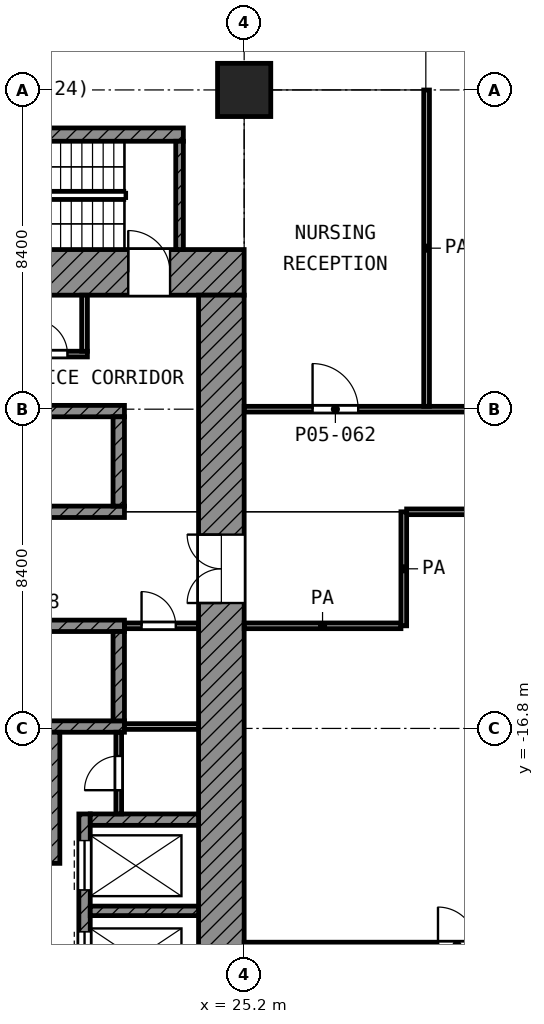
"""IFC4 building model, lengths in metres.
Left out: names, types, materials, properties, quantities, classifications, styles, units other than length and angle.
Written with IfcOpenShell. Run it as: python <this file> out.ifc"""

import sys

from ifc_helpers import new_model, si_unit, direction, frame, frame_2d, origin, origin_2d, place, context, subcontext, project, spatial, rectangle, extrude, element, fill, save


model = new_model("IFC4")
c1 = context("Model", 3, precision=1e-05, world=origin(), true_north=direction((0.0, 1.0)))
c2 = subcontext(c1, "Body", "Model", "MODEL_VIEW")
j1 = project(units=[si_unit("LENGTHUNIT", "METRE"), si_unit("PLANEANGLEUNIT", "RADIAN")], contexts=[c1])
p1 = place(None, origin())
s1 = spatial("IfcSite", under=j1, at=p1, CompositionType="ELEMENT")
p2 = place(p1, origin())
s2 = spatial("IfcBuilding", under=s1, at=p2, CompositionType="ELEMENT")
p3 = place(p2, frame((0.0, 0.0, 23.8)))
s3 = spatial("IfcBuildingStorey", under=s2, at=p3, CompositionType="ELEMENT", Elevation=23.8)
p4 = place(p3, frame((25.2, 0.0, 0.0), z_axis=(0.0, 0.0, 1.0), x_axis=(1.0, 0.0, 0.0)))
e1 = element("IfcColumn", 1, at=p4, inside=s3, PredefinedType="COLUMN", context=c2, shape_type="SweptSolid", body=[
    extrude(rectangle(XDim=1.4, YDim=1.4, at=origin_2d()), origin(), (0.0, 0.0, 1.0), 5.2),
])
p5 = place(p3, frame((4.2, -4.8, 0.0), z_axis=(0.0, 0.0, 1.0), x_axis=(1.0, 0.0, 0.0)))
e2 = element("IfcWall", 2, at=p5, inside=s3, PredefinedType="SHEAR", context=c2, shape_type="SweptSolid", body=[
    extrude(rectangle(XDim=21.0, YDim=1.2, at=frame_2d((10.5, 0.0))), origin(), (0.0, 0.0, 1.0), 4.85),
])
p6 = place(p5, frame((1.95, 0.0, 0.0)))
e3 = element("IfcOpeningElement", 3, at=p6, cuts=e2, PredefinedType="OPENING", context=c2, shape_type="SweptSolid", body=[
    extrude(rectangle(XDim=1.1, YDim=2.1, at=frame_2d((0.55, 1.05))), frame((0.0, 0.61, 0.0), z_axis=(0.0, -1.0, 0.0), x_axis=(1.0, 0.0, 0.0)), (0.0, 0.0, 1.0), 1.22),
])
p7 = place(p5, frame((17.95, 0.0, 0.0)))
e4 = element("IfcOpeningElement", 4, at=p7, cuts=e2, PredefinedType="OPENING", context=c2, shape_type="SweptSolid", body=[
    extrude(rectangle(XDim=1.1, YDim=2.1, at=frame_2d((0.55, 1.05))), frame((0.0, 0.61, 0.0), z_axis=(0.0, -1.0, 0.0), x_axis=(1.0, 0.0, 0.0)), (0.0, 0.0, 1.0), 1.22),
])
p8 = place(p3, frame((24.6, -24.0, 0.0), z_axis=(0.0, 0.0, 1.0), x_axis=(0.0, 1.0, 0.0)))
e5 = element("IfcWall", 5, at=p8, inside=s3, PredefinedType="SHEAR", context=c2, shape_type="SweptSolid", body=[
    extrude(rectangle(XDim=18.6, YDim=1.2, at=frame_2d((9.3, 0.0))), origin(), (0.0, 0.0, 1.0), 4.85),
])
p9 = place(p8, frame((10.5, 0.0, 0.0)))
e6 = element("IfcOpeningElement", 6, at=p9, cuts=e5, PredefinedType="OPENING", context=c2, shape_type="SweptSolid", body=[
    extrude(rectangle(XDim=1.8, YDim=2.1, at=frame_2d((0.9, 1.05))), frame((0.0, 0.61, 0.0), z_axis=(0.0, -1.0, 0.0), x_axis=(1.0, 0.0, 0.0)), (0.0, 0.0, 1.0), 1.22),
])
p10 = place(p3, frame((5.4, -8.45, 0.0), z_axis=(0.0, 0.0, 1.0), x_axis=(1.0, 0.0, 0.0)))
e7 = element("IfcWall", 7, at=p10, inside=s3, PredefinedType="SHEAR", context=c2, shape_type="SweptSolid", body=[
    extrude(rectangle(XDim=16.65, YDim=0.3, at=frame_2d((8.325, 0.0))), origin(), (0.0, 0.0, 1.0), 4.85),
])
p11 = place(p3, frame((5.4, -11.1, 0.0), z_axis=(0.0, 0.0, 1.0), x_axis=(1.0, 0.0, 0.0)))
e8 = element("IfcWall", 8, at=p11, inside=s3, PredefinedType="SHEAR", context=c2, shape_type="SweptSolid", body=[
    extrude(rectangle(XDim=16.65, YDim=0.3, at=frame_2d((8.325, 0.0))), origin(), (0.0, 0.0, 1.0), 4.85),
])
p12 = place(p11, frame((0.825, 0.0, 0.0)))
e9 = element("IfcOpeningElement", 9, at=p12, cuts=e8, PredefinedType="OPENING", context=c2, shape_type="SweptSolid", body=[
    extrude(rectangle(XDim=1.1, YDim=2.1, at=frame_2d((0.55, 1.05))), frame((0.0, 0.16, 0.0), z_axis=(0.0, -1.0, 0.0), x_axis=(1.0, 0.0, 0.0)), (0.0, 0.0, 1.0), 0.32),
])
p13 = place(p11, frame((3.575, 0.0, 0.0)))
e10 = element("IfcOpeningElement", 10, at=p13, cuts=e8, PredefinedType="OPENING", context=c2, shape_type="SweptSolid", body=[
    extrude(rectangle(XDim=1.1, YDim=2.1, at=frame_2d((0.55, 1.05))), frame((0.0, 0.16, 0.0), z_axis=(0.0, -1.0, 0.0), x_axis=(1.0, 0.0, 0.0)), (0.0, 0.0, 1.0), 0.32),
])
p14 = place(p11, frame((6.325, 0.0, 0.0)))
e11 = element("IfcOpeningElement", 11, at=p14, cuts=e8, PredefinedType="OPENING", context=c2, shape_type="SweptSolid", body=[
    extrude(rectangle(XDim=1.1, YDim=2.1, at=frame_2d((0.55, 1.05))), frame((0.0, 0.16, 0.0), z_axis=(0.0, -1.0, 0.0), x_axis=(1.0, 0.0, 0.0)), (0.0, 0.0, 1.0), 0.32),
])
p15 = place(p11, frame((9.075, 0.0, 0.0)))
e12 = element("IfcOpeningElement", 12, at=p15, cuts=e8, PredefinedType="OPENING", context=c2, shape_type="SweptSolid", body=[
    extrude(rectangle(XDim=1.1, YDim=2.1, at=frame_2d((0.55, 1.05))), frame((0.0, 0.16, 0.0), z_axis=(0.0, -1.0, 0.0), x_axis=(1.0, 0.0, 0.0)), (0.0, 0.0, 1.0), 0.32),
])
for number, where, z_axis, x_axis in (
    (13, (5.4, -14.1, 0.0), (0.0, 0.0, 1.0), (1.0, 0.0, 0.0)),
    (14, (5.4, -16.75, 0.0), (0.0, 0.0, 1.0), (1.0, 0.0, 0.0)),
):
    element("IfcWall", number, at=place(p3, frame(where, z_axis=z_axis, x_axis=x_axis)), inside=s3, PredefinedType="SHEAR", context=c2, shape_type="SweptSolid", body=[
        extrude(rectangle(XDim=16.65, YDim=0.3, at=frame_2d((8.325, 0.0))), origin(), (0.0, 0.0, 1.0), 4.85),
    ])
p16 = place(p3, frame((20.2, -20.35, 0.0), z_axis=(0.0, 0.0, 1.0), x_axis=(0.0, 1.0, 0.0)))
e15 = element("IfcWall", 15, at=p16, inside=s3, PredefinedType="SHEAR", context=c2, shape_type="SweptSolid", body=[
    extrude(rectangle(XDim=3.45, YDim=0.3, at=frame_2d((1.725, 0.0))), origin(), (0.0, 0.0, 1.0), 4.85),
])
p17 = place(p3, frame((21.9, -10.95, 0.0), z_axis=(0.0, 0.0, 1.0), x_axis=(0.0, 1.0, 0.0)))
e16 = element("IfcWall", 16, at=p17, inside=s3, PredefinedType="SHEAR", context=c2, shape_type="SweptSolid", body=[
    extrude(rectangle(XDim=2.35, YDim=0.3, at=frame_2d((1.175, 0.0))), origin(), (0.0, 0.0, 1.0), 4.85),
])
p18 = place(p3, frame((21.9, -16.6, 0.0), z_axis=(0.0, 0.0, 1.0), x_axis=(0.0, 1.0, 0.0)))
e17 = element("IfcWall", 17, at=p18, inside=s3, PredefinedType="SHEAR", context=c2, shape_type="SweptSolid", body=[
    extrude(rectangle(XDim=2.35, YDim=0.3, at=frame_2d((1.175, 0.0))), origin(), (0.0, 0.0, 1.0), 4.85),
])
p19 = place(p3, frame((21.15, -19.2, 0.0), z_axis=(0.0, 0.0, 1.0), x_axis=(1.0, 0.0, 0.0)))
e18 = element("IfcWall", 18, at=p19, inside=s3, PredefinedType="SHEAR", context=c2, shape_type="SweptSolid", body=[
    extrude(rectangle(XDim=2.85, YDim=0.3, at=frame_2d((1.425, 0.0))), origin(), (0.0, 0.0, 1.0), 4.85),
])
p20 = place(p3, frame((21.0, -24.0, 0.0), z_axis=(0.0, 0.0, 1.0), x_axis=(0.0, 1.0, 0.0)))
e19 = element("IfcWall", 19, at=p20, inside=s3, PredefinedType="SHEAR", context=c2, shape_type="SweptSolid", body=[
    extrude(rectangle(XDim=4.95, YDim=0.3, at=frame_2d((2.475, 0.0))), origin(), (0.0, 0.0, 1.0), 4.85),
])
p21 = place(p20, frame((2.95, 0.0, 0.0)))
e20 = element("IfcOpeningElement", 20, at=p21, cuts=e19, PredefinedType="OPENING", context=c2, shape_type="SweptSolid", body=[
    extrude(rectangle(XDim=1.3, YDim=2.1, at=frame_2d((0.65, 1.05))), frame((0.0, 0.16, 0.0), z_axis=(0.0, -1.0, 0.0), x_axis=(1.0, 0.0, 0.0)), (0.0, 0.0, 1.0), 0.32),
])
p22 = place(p20, frame((0.55, 0.0, 0.0)))
e21 = element("IfcOpeningElement", 21, at=p22, cuts=e19, PredefinedType="OPENING", context=c2, shape_type="SweptSolid", body=[
    extrude(rectangle(XDim=1.3, YDim=2.1, at=frame_2d((0.65, 1.05))), frame((0.0, 0.16, 0.0), z_axis=(0.0, -1.0, 0.0), x_axis=(1.0, 0.0, 0.0)), (0.0, 0.0, 1.0), 0.32),
])
p23 = place(p3, frame((21.15, -21.6, 0.0), z_axis=(0.0, 0.0, 1.0), x_axis=(1.0, 0.0, 0.0)))
e22 = element("IfcWall", 22, at=p23, inside=s3, PredefinedType="SHEAR", context=c2, shape_type="SweptSolid", body=[
    extrude(rectangle(XDim=2.85, YDim=0.25, at=frame_2d((1.425, 0.0))), origin(), (0.0, 0.0, 1.0), 4.85),
])
p24 = place(p3, frame((21.9, -19.05, 0.0), z_axis=(0.0, 0.0, 1.0), x_axis=(0.0, 1.0, 0.0)))
e23 = element("IfcWall", 23, at=p24, inside=s3, PredefinedType="PARTITIONING", context=c2, shape_type="SweptSolid", body=[
    extrude(rectangle(XDim=2.15, YDim=0.15, at=frame_2d((1.075, 0.0))), origin(), (0.0, 0.0, 1.0), 4.85),
])
p25 = place(p24, frame((0.625, 0.0, 0.0)))
e24 = element("IfcOpeningElement", 24, at=p25, cuts=e23, PredefinedType="OPENING", context=c2, shape_type="SweptSolid", body=[
    extrude(rectangle(XDim=0.9, YDim=2.1, at=frame_2d((0.45, 1.05))), frame((0.0, 0.085, 0.0), z_axis=(0.0, -1.0, 0.0), x_axis=(1.0, 0.0, 0.0)), (0.0, 0.0, 1.0), 0.17),
])
p26 = place(p3, frame((22.05, -16.75, 0.0), z_axis=(0.0, 0.0, 1.0), x_axis=(1.0, 0.0, 0.0)))
e25 = element("IfcWall", 25, at=p26, inside=s3, PredefinedType="PARTITIONING", context=c2, shape_type="SweptSolid", body=[
    extrude(rectangle(XDim=1.95, YDim=0.15, at=frame_2d((0.975, 0.0))), origin(), (0.0, 0.0, 1.0), 4.85),
])
p27 = place(p3, frame((22.05, -14.1, 0.0), z_axis=(0.0, 0.0, 1.0), x_axis=(1.0, 0.0, 0.0)))
e26 = element("IfcWall", 26, at=p27, inside=s3, PredefinedType="PARTITIONING", context=c2, shape_type="SweptSolid", body=[
    extrude(rectangle(XDim=1.95, YDim=0.15, at=frame_2d((0.975, 0.0))), origin(), (0.0, 0.0, 1.0), 4.85),
])
p28 = place(p27, frame((0.45, 0.0, 0.0)))
e27 = element("IfcOpeningElement", 27, at=p28, cuts=e26, PredefinedType="OPENING", context=c2, shape_type="SweptSolid", body=[
    extrude(rectangle(XDim=0.9, YDim=2.1, at=frame_2d((0.45, 1.05))), frame((0.0, 0.085, 0.0), z_axis=(0.0, -1.0, 0.0), x_axis=(1.0, 0.0, 0.0)), (0.0, 0.0, 1.0), 0.17),
])
p29 = place(p3, frame((8.325, -6.95, 0.0), z_axis=(0.0, 0.0, 1.0), x_axis=(1.0, 0.0, 0.0)))
e28 = element("IfcWall", 28, at=p29, inside=s3, PredefinedType="PARTITIONING", context=c2, shape_type="SweptSolid", body=[
    extrude(rectangle(XDim=12.75, YDim=0.15, at=frame_2d((6.375, 0.0))), origin(), (0.0, 0.0, 1.0), 4.85),
])
p30 = place(p29, frame((1.125, 0.0, 0.0)))
e29 = element("IfcOpeningElement", 29, at=p30, cuts=e28, PredefinedType="OPENING", context=c2, shape_type="SweptSolid", body=[
    extrude(rectangle(XDim=0.9, YDim=2.1, at=frame_2d((0.45, 1.05))), frame((0.0, 0.085, 0.0), z_axis=(0.0, -1.0, 0.0), x_axis=(1.0, 0.0, 0.0)), (0.0, 0.0, 1.0), 0.17),
])
p31 = place(p29, frame((3.225, 0.0, 0.0)))
e30 = element("IfcOpeningElement", 30, at=p31, cuts=e28, PredefinedType="OPENING", context=c2, shape_type="SweptSolid", body=[
    extrude(rectangle(XDim=0.9, YDim=2.1, at=frame_2d((0.45, 1.05))), frame((0.0, 0.085, 0.0), z_axis=(0.0, -1.0, 0.0), x_axis=(1.0, 0.0, 0.0)), (0.0, 0.0, 1.0), 0.17),
])
p32 = place(p29, frame((5.025, 0.0, 0.0)))
e31 = element("IfcOpeningElement", 31, at=p32, cuts=e28, PredefinedType="OPENING", context=c2, shape_type="SweptSolid", body=[
    extrude(rectangle(XDim=0.9, YDim=2.1, at=frame_2d((0.45, 1.05))), frame((0.0, 0.085, 0.0), z_axis=(0.0, -1.0, 0.0), x_axis=(1.0, 0.0, 0.0)), (0.0, 0.0, 1.0), 0.17),
])
p33 = place(p29, frame((7.425, 0.0, 0.0)))
e32 = element("IfcOpeningElement", 32, at=p33, cuts=e28, PredefinedType="OPENING", context=c2, shape_type="SweptSolid", body=[
    extrude(rectangle(XDim=0.9, YDim=2.1, at=frame_2d((0.45, 1.05))), frame((0.0, 0.085, 0.0), z_axis=(0.0, -1.0, 0.0), x_axis=(1.0, 0.0, 0.0)), (0.0, 0.0, 1.0), 0.17),
])
p34 = place(p29, frame((9.525, 0.0, 0.0)))
e33 = element("IfcOpeningElement", 33, at=p34, cuts=e28, PredefinedType="OPENING", context=c2, shape_type="SweptSolid", body=[
    extrude(rectangle(XDim=0.9, YDim=2.1, at=frame_2d((0.45, 1.05))), frame((0.0, 0.085, 0.0), z_axis=(0.0, -1.0, 0.0), x_axis=(1.0, 0.0, 0.0)), (0.0, 0.0, 1.0), 0.17),
])
p35 = place(p29, frame((11.325, 0.0, 0.0)))
e34 = element("IfcOpeningElement", 34, at=p35, cuts=e28, PredefinedType="OPENING", context=c2, shape_type="SweptSolid", body=[
    extrude(rectangle(XDim=0.9, YDim=2.1, at=frame_2d((0.45, 1.05))), frame((0.0, 0.085, 0.0), z_axis=(0.0, -1.0, 0.0), x_axis=(1.0, 0.0, 0.0)), (0.0, 0.0, 1.0), 0.17),
])
p36 = place(p3, frame((21.0, -6.875, 0.0), z_axis=(0.0, 0.0, 1.0), x_axis=(0.0, 1.0, 0.0)))
e35 = element("IfcWall", 35, at=p36, inside=s3, PredefinedType="PARTITIONING", context=c2, shape_type="SweptSolid", body=[
    extrude(rectangle(XDim=1.475, YDim=0.15, at=frame_2d((0.738, 0.0))), origin(), (0.0, 0.0, 1.0), 4.85),
])
p37 = place(p3, frame((15.15, -1.175, 0.0), z_axis=(0.0, 0.0, 1.0), x_axis=(1.0, 0.0, 0.0)))
e36 = element("IfcWall", 36, at=p37, inside=s3, PredefinedType="SHEAR", context=c2, shape_type="SweptSolid", body=[
    extrude(rectangle(XDim=8.45, YDim=0.35, at=frame_2d((4.225, 0.0))), origin(), (0.0, 0.0, 1.0), 4.85),
])
p38 = place(p3, frame((23.5, -4.2, 0.0), z_axis=(0.0, 0.0, 1.0), x_axis=(0.0, 1.0, 0.0)))
e37 = element("IfcWall", 37, at=p38, inside=s3, PredefinedType="SHEAR", context=c2, shape_type="SweptSolid", body=[
    extrude(rectangle(XDim=2.85, YDim=0.2, at=frame_2d((1.425, 0.0))), origin(), (0.0, 0.0, 1.0), 4.85),
])
p39 = place(p3, frame((25.2, -22.5, 0.0), z_axis=(0.0, 0.0, 1.0), x_axis=(1.0, 0.0, 0.0)))
e38 = element("IfcWall", 38, at=p39, inside=s3, PredefinedType="PARTITIONING", context=c2, shape_type="SweptSolid", body=[
    extrude(rectangle(XDim=58.7, YDim=0.15, at=frame_2d((29.35, 0.0))), origin(), (0.0, 0.0, 1.0), 4.85),
])
p40 = place(p39, frame((5.1, 0.0, 0.0)))
e39 = element("IfcOpeningElement", 39, at=p40, cuts=e38, PredefinedType="OPENING", context=c2, shape_type="SweptSolid", body=[
    extrude(rectangle(XDim=1.0, YDim=2.1, at=frame_2d((0.5, 1.05))), frame((0.0, 0.085, 0.0), z_axis=(0.0, -1.0, 0.0), x_axis=(1.0, 0.0, 0.0)), (0.0, 0.0, 1.0), 0.17),
])
p41 = place(p39, frame((10.7, 0.0, 0.0)))
e40 = element("IfcOpeningElement", 40, at=p41, cuts=e38, PredefinedType="OPENING", context=c2, shape_type="SweptSolid", body=[
    extrude(rectangle(XDim=1.0, YDim=2.1, at=frame_2d((0.5, 1.05))), frame((0.0, 0.085, 0.0), z_axis=(0.0, -1.0, 0.0), x_axis=(1.0, 0.0, 0.0)), (0.0, 0.0, 1.0), 0.17),
])
p42 = place(p39, frame((35.9, 0.0, 0.0)))
e41 = element("IfcOpeningElement", 41, at=p42, cuts=e38, PredefinedType="OPENING", context=c2, shape_type="SweptSolid", body=[
    extrude(rectangle(XDim=1.0, YDim=2.1, at=frame_2d((0.5, 1.05))), frame((0.0, 0.085, 0.0), z_axis=(0.0, -1.0, 0.0), x_axis=(1.0, 0.0, 0.0)), (0.0, 0.0, 1.0), 0.17),
])
p43 = place(p39, frame((38.7, 0.0, 0.0)))
e42 = element("IfcOpeningElement", 42, at=p43, cuts=e38, PredefinedType="OPENING", context=c2, shape_type="SweptSolid", body=[
    extrude(rectangle(XDim=1.0, YDim=2.1, at=frame_2d((0.5, 1.05))), frame((0.0, 0.085, 0.0), z_axis=(0.0, -1.0, 0.0), x_axis=(1.0, 0.0, 0.0)), (0.0, 0.0, 1.0), 0.17),
])
p44 = place(p3, frame((25.2, -14.1, 0.0), z_axis=(0.0, 0.0, 1.0), x_axis=(1.0, 0.0, 0.0)))
e43 = element("IfcWall", 43, at=p44, inside=s3, PredefinedType="PARTITIONING", context=c2, shape_type="SweptSolid", body=[
    extrude(rectangle(XDim=4.125, YDim=0.15, at=frame_2d((2.062, 0.0))), origin(), (0.0, 0.0, 1.0), 4.85),
])
p45 = place(p3, frame((29.475, -11.1, 0.0), z_axis=(0.0, 0.0, 1.0), x_axis=(1.0, 0.0, 0.0)))
e44 = element("IfcWall", 44, at=p45, inside=s3, PredefinedType="PARTITIONING", context=c2, shape_type="SweptSolid", body=[
    extrude(rectangle(XDim=54.425, YDim=0.15, at=frame_2d((27.212, 0.0))), origin(), (0.0, 0.0, 1.0), 4.85),
])
p46 = place(p45, frame((23.225, 0.0, 0.0)))
e45 = element("IfcOpeningElement", 45, at=p46, cuts=e44, PredefinedType="OPENING", context=c2, shape_type="SweptSolid", body=[
    extrude(rectangle(XDim=1.0, YDim=2.1, at=frame_2d((0.5, 1.05))), frame((0.0, 0.085, 0.0), z_axis=(0.0, -1.0, 0.0), x_axis=(1.0, 0.0, 0.0)), (0.0, 0.0, 1.0), 0.17),
])
p47 = place(p45, frame((17.625, 0.0, 0.0)))
e46 = element("IfcOpeningElement", 46, at=p47, cuts=e44, PredefinedType="OPENING", context=c2, shape_type="SweptSolid", body=[
    extrude(rectangle(XDim=1.0, YDim=2.1, at=frame_2d((0.5, 1.05))), frame((0.0, 0.085, 0.0), z_axis=(0.0, -1.0, 0.0), x_axis=(1.0, 0.0, 0.0)), (0.0, 0.0, 1.0), 0.17),
])
p48 = place(p45, frame((42.825, 0.0, 0.0)))
e47 = element("IfcOpeningElement", 47, at=p48, cuts=e44, PredefinedType="OPENING", context=c2, shape_type="SweptSolid", body=[
    extrude(rectangle(XDim=1.0, YDim=2.1, at=frame_2d((0.5, 1.05))), frame((0.0, 0.085, 0.0), z_axis=(0.0, -1.0, 0.0), x_axis=(1.0, 0.0, 0.0)), (0.0, 0.0, 1.0), 0.17),
])
p49 = place(p45, frame((40.025, 0.0, 0.0)))
e48 = element("IfcOpeningElement", 48, at=p49, cuts=e44, PredefinedType="OPENING", context=c2, shape_type="SweptSolid", body=[
    extrude(rectangle(XDim=1.0, YDim=2.1, at=frame_2d((0.5, 1.05))), frame((0.0, 0.085, 0.0), z_axis=(0.0, -1.0, 0.0), x_axis=(1.0, 0.0, 0.0)), (0.0, 0.0, 1.0), 0.17),
])
p50 = place(p45, frame((51.225, 0.0, 0.0)))
e49 = element("IfcOpeningElement", 49, at=p50, cuts=e44, PredefinedType="OPENING", context=c2, shape_type="SweptSolid", body=[
    extrude(rectangle(XDim=1.0, YDim=2.1, at=frame_2d((0.5, 1.05))), frame((0.0, 0.085, 0.0), z_axis=(0.0, -1.0, 0.0), x_axis=(1.0, 0.0, 0.0)), (0.0, 0.0, 1.0), 0.17),
])
p51 = place(p45, frame((48.425, 0.0, 0.0)))
e50 = element("IfcOpeningElement", 50, at=p51, cuts=e44, PredefinedType="OPENING", context=c2, shape_type="SweptSolid", body=[
    extrude(rectangle(XDim=1.0, YDim=2.1, at=frame_2d((0.5, 1.05))), frame((0.0, 0.085, 0.0), z_axis=(0.0, -1.0, 0.0), x_axis=(1.0, 0.0, 0.0)), (0.0, 0.0, 1.0), 0.17),
])
p52 = place(p3, frame((25.2, -8.4, 0.0), z_axis=(0.0, 0.0, 1.0), x_axis=(1.0, 0.0, 0.0)))
e51 = element("IfcWall", 51, at=p52, inside=s3, PredefinedType="PARTITIONING", context=c2, shape_type="SweptSolid", body=[
    extrude(rectangle(XDim=14.732, YDim=0.15, at=frame_2d((7.366, 0.0))), origin(), (0.0, 0.0, 1.0), 4.85),
])
p53 = place(p52, frame((1.8, 0.0, 0.0)))
e52 = element("IfcOpeningElement", 52, at=p53, cuts=e51, PredefinedType="OPENING", context=c2, shape_type="SweptSolid", body=[
    extrude(rectangle(XDim=1.2, YDim=2.1, at=frame_2d((0.6, 1.05))), frame((0.0, 0.085, 0.0), z_axis=(0.0, -1.0, 0.0), x_axis=(1.0, 0.0, 0.0)), (0.0, 0.0, 1.0), 0.17),
])
p54 = place(p52, frame((6.536, 0.0, 0.0)))
e53 = element("IfcOpeningElement", 53, at=p54, cuts=e51, PredefinedType="OPENING", context=c2, shape_type="SweptSolid", body=[
    extrude(rectangle(XDim=1.0, YDim=2.1, at=frame_2d((0.5, 1.05))), frame((0.0, 0.085, 0.0), z_axis=(0.0, -1.0, 0.0), x_axis=(1.0, 0.0, 0.0)), (0.0, 0.0, 1.0), 0.17),
])
p55 = place(p52, frame((10.971, 0.0, 0.0)))
e54 = element("IfcOpeningElement", 54, at=p55, cuts=e51, PredefinedType="OPENING", context=c2, shape_type="SweptSolid", body=[
    extrude(rectangle(XDim=1.0, YDim=2.1, at=frame_2d((0.5, 1.05))), frame((0.0, 0.085, 0.0), z_axis=(0.0, -1.0, 0.0), x_axis=(1.0, 0.0, 0.0)), (0.0, 0.0, 1.0), 0.17),
])
p56 = place(p3, frame((29.4, -14.1, 0.0), z_axis=(0.0, 0.0, 1.0), x_axis=(0.0, 1.0, 0.0)))
e55 = element("IfcWall", 55, at=p56, inside=s3, PredefinedType="PARTITIONING", context=c2, shape_type="SweptSolid", body=[
    extrude(rectangle(XDim=3.0, YDim=0.15, at=frame_2d((1.5, 0.0))), origin(), (0.0, 0.0, 1.0), 4.85),
])
p57 = place(p3, frame((30.0, -8.325, 0.0), z_axis=(0.0, 0.0, 1.0), x_axis=(0.0, 1.0, 0.0)))
e56 = element("IfcWall", 56, at=p57, inside=s3, PredefinedType="PARTITIONING", context=c2, shape_type="SweptSolid", body=[
    extrude(rectangle(XDim=8.323, YDim=0.15, at=frame_2d((4.162, 0.0))), origin(), (0.0, 0.0, 1.0), 3.45),
])
p58 = place(p21, origin())
e57 = element("IfcDoor", 57, at=p58, inside=s3, OperationType="DOUBLE_DOOR_SLIDING", PredefinedType="DOOR", context=c2, shape_type="SweptSolid", body=[
    extrude(rectangle(XDim=1.3, YDim=2.1, at=frame_2d((0.65, 1.05))), frame((0.0, 0.025, 0.0), z_axis=(0.0, -1.0, 0.0), x_axis=(1.0, 0.0, 0.0)), (0.0, 0.0, 1.0), 0.05),
])
fill(e20, e57)
p59 = place(p22, origin())
e58 = element("IfcDoor", 58, at=p59, inside=s3, OperationType="DOUBLE_DOOR_SLIDING", PredefinedType="DOOR", context=c2, shape_type="SweptSolid", body=[
    extrude(rectangle(XDim=1.3, YDim=2.1, at=frame_2d((0.65, 1.05))), frame((0.0, 0.025, 0.0), z_axis=(0.0, -1.0, 0.0), x_axis=(1.0, 0.0, 0.0)), (0.0, 0.0, 1.0), 0.05),
])
fill(e21, e58)
p60 = place(p7, origin())
e59 = element("IfcDoor", 59, at=p60, inside=s3, OperationType="SINGLE_SWING_LEFT", PredefinedType="DOOR", context=c2, shape_type="SweptSolid", body=[
    extrude(rectangle(XDim=1.1, YDim=2.1, at=frame_2d((0.55, 1.05))), frame((0.0, 0.025, 0.0), z_axis=(0.0, -1.0, 0.0), x_axis=(1.0, 0.0, 0.0)), (0.0, 0.0, 1.0), 0.05),
])
fill(e4, e59)
p61 = place(p9, origin())
e60 = element("IfcDoor", 60, at=p61, inside=s3, OperationType="DOUBLE_DOOR_SINGLE_SWING", PredefinedType="DOOR", context=c2, shape_type="SweptSolid", body=[
    extrude(rectangle(XDim=1.8, YDim=2.1, at=frame_2d((0.9, 1.05))), frame((0.0, 0.025, 0.0), z_axis=(0.0, -1.0, 0.0), x_axis=(1.0, 0.0, 0.0)), (0.0, 0.0, 1.0), 0.05),
])
fill(e6, e60)
p62 = place(p35, origin())
e61 = element("IfcDoor", 61, at=p62, inside=s3, OperationType="SINGLE_SWING_LEFT", PredefinedType="DOOR", context=c2, shape_type="SweptSolid", body=[
    extrude(rectangle(XDim=0.9, YDim=2.1, at=frame_2d((0.45, 1.05))), frame((0.0, 0.025, 0.0), z_axis=(0.0, -1.0, 0.0), x_axis=(1.0, 0.0, 0.0)), (0.0, 0.0, 1.0), 0.05),
])
fill(e34, e61)
p63 = place(p28, origin())
e62 = element("IfcDoor", 62, at=p63, inside=s3, OperationType="SINGLE_SWING_LEFT", PredefinedType="DOOR", context=c2, shape_type="SweptSolid", body=[
    extrude(rectangle(XDim=0.9, YDim=2.1, at=frame_2d((0.45, 1.05))), frame((0.0, 0.025, 0.0), z_axis=(0.0, -1.0, 0.0), x_axis=(1.0, 0.0, 0.0)), (0.0, 0.0, 1.0), 0.05),
])
fill(e27, e62)
p64 = place(p25, origin())
e63 = element("IfcDoor", 63, at=p64, inside=s3, OperationType="SINGLE_SWING_LEFT", PredefinedType="DOOR", context=c2, shape_type="SweptSolid", body=[
    extrude(rectangle(XDim=0.9, YDim=2.1, at=frame_2d((0.45, 1.05))), frame((0.0, 0.025, 0.0), z_axis=(0.0, -1.0, 0.0), x_axis=(1.0, 0.0, 0.0)), (0.0, 0.0, 1.0), 0.05),
])
fill(e24, e63)
p65 = place(p53, origin())
e64 = element("IfcDoor", 64, at=p65, inside=s3, OperationType="SINGLE_SWING_LEFT", PredefinedType="DOOR", context=c2, shape_type="SweptSolid", body=[
    extrude(rectangle(XDim=1.2, YDim=2.1, at=frame_2d((0.6, 1.05))), frame((0.0, 0.025, 0.0), z_axis=(0.0, -1.0, 0.0), x_axis=(1.0, 0.0, 0.0)), (0.0, 0.0, 1.0), 0.05),
])
fill(e52, e64)
save(model, sys.argv[1])
